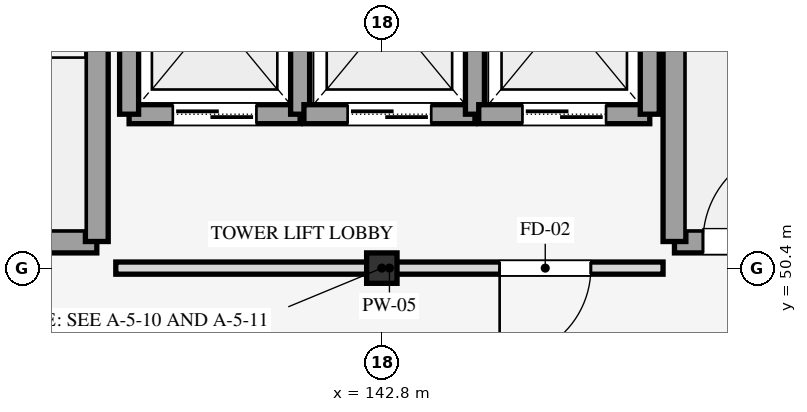
"""IFC4 building model, lengths in metres.
Left out: names, types, materials, properties, quantities, classifications, styles, units other than length and angle.
Written with IfcOpenShell. Run it as: python <this file> out.ifc"""

import sys

from ifc_helpers import new_model, si_unit, direction, frame, frame_2d, origin, origin_2d, place, context, subcontext, project, spatial, rectangle, i_section, extrude, element, fill, save


model = new_model("IFC4")
c1 = context("Model", 3, precision=1e-05, world=origin(), true_north=direction((0.0, 1.0)))
c2 = subcontext(c1, "Body", "Model", "MODEL_VIEW")
j1 = project(units=[si_unit("LENGTHUNIT", "METRE"), si_unit("PLANEANGLEUNIT", "RADIAN")], contexts=[c1])
p1 = place(None, origin())
s1 = spatial("IfcSite", under=j1, at=p1, CompositionType="ELEMENT")
p2 = place(p1, origin())
s2 = spatial("IfcBuilding", under=s1, at=p2, CompositionType="ELEMENT")
p3 = place(p2, frame((0.0, 0.0, 18.9)))
s3 = spatial("IfcBuildingStorey", under=s2, at=p3, CompositionType="ELEMENT", Elevation=18.9)
p4 = place(p3, frame((142.8, 50.4, 0.0), z_axis=(0.0, 0.0, 1.0), x_axis=(1.0, 0.0, 0.0)))
e1 = element("IfcColumn", 1, at=p4, inside=s3, PredefinedType="COLUMN", context=c2, shape_type="SweptSolid", body=[
    extrude(i_section(OverallWidth=0.4, OverallDepth=0.4, WebThickness=0.013, FlangeThickness=0.021, FilletRadius=0.022, at=origin_2d()), origin(), (0.0, 0.0, 1.0), 4.5),
])
p5 = place(p3, frame((135.05, 50.75, 0.0), z_axis=(0.0, 0.0, 1.0), x_axis=(1.0, 0.0, 0.0)))
e2 = element("IfcWall", 2, at=p5, inside=s3, PredefinedType="SHEAR", context=c2, shape_type="SweptSolid", body=[
    extrude(rectangle(XDim=4.0, YDim=0.3, at=frame_2d((2.0, 0.0))), origin(), (0.0, 0.0, 1.0), 4.5),
])
p6 = place(p5, frame((0.375, 0.0, 0.0)))
e3 = element("IfcOpeningElement", 3, at=p6, cuts=e2, PredefinedType="OPENING", context=c2, shape_type="SweptSolid", body=[
    extrude(rectangle(XDim=1.25, YDim=2.15, at=frame_2d((0.625, 1.075))), frame((0.0, 0.16, 0.0), z_axis=(0.0, -1.0, 0.0), x_axis=(1.0, 0.0, 0.0)), (0.0, 0.0, 1.0), 0.32),
])
p7 = place(p3, frame((139.05, 50.75, 0.0), z_axis=(0.0, 0.0, 1.0), x_axis=(0.0, 1.0, 0.0)))
e4 = element("IfcWall", 4, at=p7, inside=s3, PredefinedType="SHEAR", context=c2, shape_type="SweptSolid", body=[
    extrude(rectangle(XDim=14.3, YDim=0.3, at=frame_2d((7.15, 0.0))), origin(), (0.0, 0.0, 1.0), 4.5),
])
p8 = place(p3, frame((146.65, 50.75, 0.0), z_axis=(0.0, 0.0, 1.0), x_axis=(1.0, 0.0, 0.0)))
e5 = element("IfcWall", 5, at=p8, inside=s3, PredefinedType="SHEAR", context=c2, shape_type="SweptSolid", body=[
    extrude(rectangle(XDim=4.0, YDim=0.3, at=frame_2d((2.0, 0.0))), origin(), (0.0, 0.0, 1.0), 4.5),
])
p9 = place(p8, frame((0.375, 0.0, 0.0)))
e6 = element("IfcOpeningElement", 6, at=p9, cuts=e5, PredefinedType="OPENING", context=c2, shape_type="SweptSolid", body=[
    extrude(rectangle(XDim=1.25, YDim=2.15, at=frame_2d((0.625, 1.075))), frame((0.0, 0.16, 0.0), z_axis=(0.0, -1.0, 0.0), x_axis=(1.0, 0.0, 0.0)), (0.0, 0.0, 1.0), 0.32),
])
p10 = place(p3, frame((146.65, 50.75, 0.0), z_axis=(0.0, 0.0, 1.0), x_axis=(0.0, 1.0, 0.0)))
e7 = element("IfcWall", 7, at=p10, inside=s3, PredefinedType="SHEAR", context=c2, shape_type="SweptSolid", body=[
    extrude(rectangle(XDim=14.3, YDim=0.3, at=frame_2d((7.15, 0.0))), origin(), (0.0, 0.0, 1.0), 4.5),
])
p11 = place(p3, frame((139.475, 52.425, 0.0), z_axis=(0.0, 0.0, 1.0), x_axis=(1.0, 0.0, 0.0)))
e8 = element("IfcWall", 8, at=p11, inside=s3, PredefinedType="SHEAR", context=c2, shape_type="SweptSolid", body=[
    extrude(rectangle(XDim=2.25, YDim=0.25, at=frame_2d((1.125, 0.0))), origin(), (0.0, 0.0, 1.0), 4.24),
])
p12 = place(p11, frame((0.575, 0.0, 0.0)))
e9 = element("IfcOpeningElement", 9, at=p12, cuts=e8, PredefinedType="OPENING", context=c2, shape_type="SweptSolid", body=[
    extrude(rectangle(XDim=1.1, YDim=2.15, at=frame_2d((0.55, 1.075))), frame((0.0, 0.135, 0.0), z_axis=(0.0, -1.0, 0.0), x_axis=(1.0, 0.0, 0.0)), (0.0, 0.0, 1.0), 0.27),
])
for number, where, z_axis, x_axis in (
    (10, (139.475, 52.425, 0.0), (0.0, 0.0, 1.0), (0.0, 1.0, 0.0)),
    (11, (141.725, 52.425, 0.0), (0.0, 0.0, 1.0), (0.0, 1.0, 0.0)),
):
    element("IfcWall", number, at=place(p3, frame(where, z_axis=z_axis, x_axis=x_axis)), inside=s3, PredefinedType="SHEAR", context=c2, shape_type="SweptSolid", body=[
        extrude(rectangle(XDim=2.65, YDim=0.25, at=frame_2d((1.325, 0.0))), origin(), (0.0, 0.0, 1.0), 4.24),
    ])
p13 = place(p3, frame((141.775, 52.425, 0.0), z_axis=(0.0, 0.0, 1.0), x_axis=(1.0, 0.0, 0.0)))
e12 = element("IfcWall", 12, at=p13, inside=s3, PredefinedType="SHEAR", context=c2, shape_type="SweptSolid", body=[
    extrude(rectangle(XDim=2.25, YDim=0.25, at=frame_2d((1.125, 0.0))), origin(), (0.0, 0.0, 1.0), 4.24),
])
p14 = place(p13, frame((0.575, 0.0, 0.0)))
e13 = element("IfcOpeningElement", 13, at=p14, cuts=e12, PredefinedType="OPENING", context=c2, shape_type="SweptSolid", body=[
    extrude(rectangle(XDim=1.1, YDim=2.15, at=frame_2d((0.55, 1.075))), frame((0.0, 0.135, 0.0), z_axis=(0.0, -1.0, 0.0), x_axis=(1.0, 0.0, 0.0)), (0.0, 0.0, 1.0), 0.27),
])
p15 = place(p3, frame((144.025, 52.425, 0.0), z_axis=(0.0, 0.0, 1.0), x_axis=(0.0, 1.0, 0.0)))
e14 = element("IfcWall", 14, at=p15, inside=s3, PredefinedType="SHEAR", context=c2, shape_type="SweptSolid", body=[
    extrude(rectangle(XDim=2.65, YDim=0.25, at=frame_2d((1.325, 0.0))), origin(), (0.0, 0.0, 1.0), 4.24),
])
p16 = place(p3, frame((144.075, 52.425, 0.0), z_axis=(0.0, 0.0, 1.0), x_axis=(1.0, 0.0, 0.0)))
e15 = element("IfcWall", 15, at=p16, inside=s3, PredefinedType="SHEAR", context=c2, shape_type="SweptSolid", body=[
    extrude(rectangle(XDim=2.25, YDim=0.25, at=frame_2d((1.125, 0.0))), origin(), (0.0, 0.0, 1.0), 4.24),
])
p17 = place(p16, frame((0.575, 0.0, 0.0)))
e16 = element("IfcOpeningElement", 16, at=p17, cuts=e15, PredefinedType="OPENING", context=c2, shape_type="SweptSolid", body=[
    extrude(rectangle(XDim=1.1, YDim=2.15, at=frame_2d((0.55, 1.075))), frame((0.0, 0.135, 0.0), z_axis=(0.0, -1.0, 0.0), x_axis=(1.0, 0.0, 0.0)), (0.0, 0.0, 1.0), 0.27),
])
p18 = place(p3, frame((146.325, 52.425, 0.0), z_axis=(0.0, 0.0, 1.0), x_axis=(0.0, 1.0, 0.0)))
e17 = element("IfcWall", 17, at=p18, inside=s3, PredefinedType="SHEAR", context=c2, shape_type="SweptSolid", body=[
    extrude(rectangle(XDim=2.65, YDim=0.25, at=frame_2d((1.325, 0.0))), origin(), (0.0, 0.0, 1.0), 4.24),
])
p19 = place(p3, frame((139.3, 50.4, 0.0), z_axis=(0.0, 0.0, 1.0), x_axis=(1.0, 0.0, 0.0)))
e18 = element("IfcWall", 18, at=p19, inside=s3, PredefinedType="PARTITIONING", context=c2, shape_type="SweptSolid", body=[
    extrude(rectangle(XDim=7.2, YDim=0.16, at=frame_2d((3.6, 0.0))), origin(), (0.0, 0.0, 1.0), 3.54),
])
p20 = place(p19, frame((5.05, 0.0, 0.0)))
e19 = element("IfcOpeningElement", 19, at=p20, cuts=e18, PredefinedType="OPENING", context=c2, shape_type="SweptSolid", body=[
    extrude(rectangle(XDim=1.2, YDim=2.15, at=frame_2d((0.6, 1.075))), frame((0.0, 0.09, 0.0), z_axis=(0.0, -1.0, 0.0), x_axis=(1.0, 0.0, 0.0)), (0.0, 0.0, 1.0), 0.18),
])
p21 = place(p9, origin())
e20 = element("IfcDoor", 20, at=p21, inside=s3, OperationType="SINGLE_SWING_RIGHT", PredefinedType="DOOR", context=c2, shape_type="SweptSolid", body=[
    extrude(rectangle(XDim=1.25, YDim=2.15, at=frame_2d((0.625, 1.075))), frame((0.0, 0.025, 0.0), z_axis=(0.0, -1.0, 0.0), x_axis=(1.0, 0.0, 0.0)), (0.0, 0.0, 1.0), 0.05),
])
fill(e6, e20)
p22 = place(p12, origin())
e21 = element("IfcDoor", 21, at=p22, inside=s3, OperationType="DOUBLE_DOOR_SLIDING", PredefinedType="DOOR", context=c2, shape_type="SweptSolid", body=[
    extrude(rectangle(XDim=1.1, YDim=2.15, at=frame_2d((0.55, 1.075))), frame((0.0, 0.025, 0.0), z_axis=(0.0, -1.0, 0.0), x_axis=(1.0, 0.0, 0.0)), (0.0, 0.0, 1.0), 0.05),
])
fill(e9, e21)
p23 = place(p14, origin())
e22 = element("IfcDoor", 22, at=p23, inside=s3, OperationType="DOUBLE_DOOR_SLIDING", PredefinedType="DOOR", context=c2, shape_type="SweptSolid", body=[
    extrude(rectangle(XDim=1.1, YDim=2.15, at=frame_2d((0.55, 1.075))), frame((0.0, 0.025, 0.0), z_axis=(0.0, -1.0, 0.0), x_axis=(1.0, 0.0, 0.0)), (0.0, 0.0, 1.0), 0.05),
])
fill(e13, e22)
p24 = place(p17, origin())
e23 = element("IfcDoor", 23, at=p24, inside=s3, OperationType="DOUBLE_DOOR_SLIDING", PredefinedType="DOOR", context=c2, shape_type="SweptSolid", body=[
    extrude(rectangle(XDim=1.1, YDim=2.15, at=frame_2d((0.55, 1.075))), frame((0.0, 0.025, 0.0), z_axis=(0.0, -1.0, 0.0), x_axis=(1.0, 0.0, 0.0)), (0.0, 0.0, 1.0), 0.05),
])
fill(e16, e23)
p25 = place(p20, frame((1.2, 0.0, 0.0), z_axis=(0.0, 0.0, 1.0), x_axis=(-1.0, 0.0, 0.0)))
e24 = element("IfcDoor", 24, at=p25, inside=s3, OperationType="SINGLE_SWING_RIGHT", PredefinedType="DOOR", context=c2, shape_type="SweptSolid", body=[
    extrude(rectangle(XDim=1.2, YDim=2.15, at=frame_2d((0.6, 1.075))), frame((0.0, 0.025, 0.0), z_axis=(0.0, -1.0, 0.0), x_axis=(1.0, 0.0, 0.0)), (0.0, 0.0, 1.0), 0.05),
])
fill(e19, e24)
save(model, sys.argv[1])
